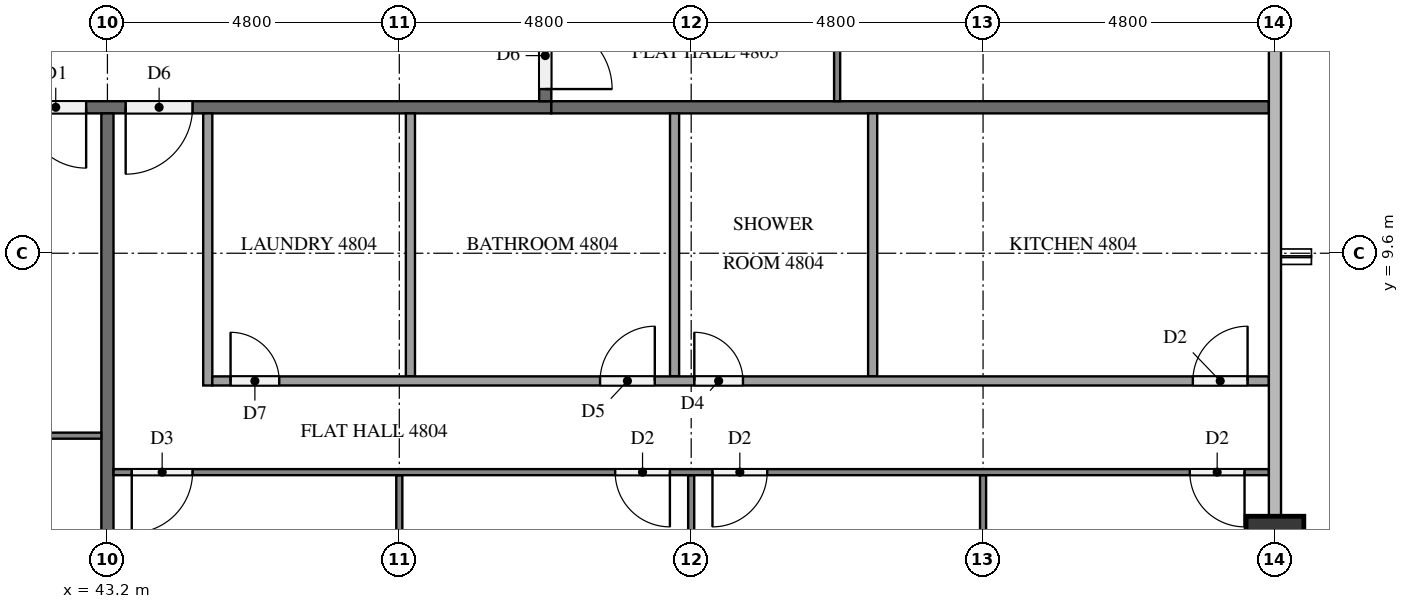
"""IFC4 building model, lengths in metres.
Left out: names, types, materials, properties, quantities, classifications, styles, units other than length and angle.
Written with IfcOpenShell. Run it as: python <this file> out.ifc"""

import sys

from ifc_helpers import new_model, si_unit, direction, frame, frame_2d, origin, origin_2d, place, context, subcontext, project, spatial, rectangle, extrude, element, fill, save


model = new_model("IFC4")
c1 = context("Model", 3, precision=1e-05, world=origin(), true_north=direction((0.0, 1.0)))
c2 = subcontext(c1, "Body", "Model", "MODEL_VIEW")
j1 = project(units=[si_unit("LENGTHUNIT", "METRE"), si_unit("PLANEANGLEUNIT", "RADIAN")], contexts=[c1])
p1 = place(None, origin())
s1 = spatial("IfcSite", under=j1, at=p1, CompositionType="ELEMENT")
p2 = place(p1, origin())
s2 = spatial("IfcBuilding", under=s1, at=p2, CompositionType="ELEMENT")
p3 = place(p2, frame((0.0, 0.0, 185.9)))
s3 = spatial("IfcBuildingStorey", under=s2, at=p3, CompositionType="ELEMENT", Elevation=185.9)
p4 = place(p3, frame((62.4, 4.8, 0.0), z_axis=(0.0, 0.0, 1.0), x_axis=(1.0, 0.0, 0.0)))
e1 = element("IfcColumn", 1, at=p4, inside=s3, PredefinedType="COLUMN", context=c2, shape_type="SweptSolid", body=[
    extrude(rectangle(XDim=0.95, YDim=0.95, at=origin_2d()), origin(), (0.0, 0.0, 1.0), 3.2),
])
p5 = place(p3, frame((50.5, 12.0, 0.0), z_axis=(0.0, 0.0, 1.0), x_axis=(-1.0, 0.0, 0.0)))
e2 = element("IfcWall", 2, at=p5, inside=s3, PredefinedType="PARTITIONING", context=c2, shape_type="SweptSolid", body=[
    extrude(rectangle(XDim=38.6, YDim=0.2, at=frame_2d((19.3, 0.0))), origin(), (0.0, 0.0, 1.0), 3.2),
])
p6 = place(p5, frame((31.65, 0.0, 0.0)))
e3 = element("IfcOpeningElement", 3, at=p6, cuts=e2, PredefinedType="OPENING", context=c2, shape_type="SweptSolid", body=[
    extrude(rectangle(XDim=1.0, YDim=2.1, at=frame_2d((0.5, 1.05))), frame((0.0, 0.11, 0.0), z_axis=(0.0, -1.0, 0.0), x_axis=(1.0, 0.0, 0.0)), (0.0, 0.0, 1.0), 0.22),
])
p7 = place(p5, frame((17.25, 0.0, 0.0)))
e4 = element("IfcOpeningElement", 4, at=p7, cuts=e2, PredefinedType="OPENING", context=c2, shape_type="SweptSolid", body=[
    extrude(rectangle(XDim=1.0, YDim=2.1, at=frame_2d((0.5, 1.05))), frame((0.0, 0.11, 0.0), z_axis=(0.0, -1.0, 0.0), x_axis=(1.0, 0.0, 0.0)), (0.0, 0.0, 1.0), 0.22),
])
p8 = place(p5, frame((7.65, 0.0, 0.0)))
e5 = element("IfcOpeningElement", 5, at=p8, cuts=e2, PredefinedType="OPENING", context=c2, shape_type="SweptSolid", body=[
    extrude(rectangle(XDim=1.0, YDim=2.1, at=frame_2d((0.5, 1.05))), frame((0.0, 0.11, 0.0), z_axis=(0.0, -1.0, 0.0), x_axis=(1.0, 0.0, 0.0)), (0.0, 0.0, 1.0), 0.22),
])
p9 = place(p5, frame((5.9, 0.0, 0.0)))
e6 = element("IfcOpeningElement", 6, at=p9, cuts=e2, PredefinedType="OPENING", context=c2, shape_type="SweptSolid", body=[
    extrude(rectangle(XDim=1.1, YDim=2.1, at=frame_2d((0.55, 1.05))), frame((0.0, 0.11, 0.0), z_axis=(0.0, -1.0, 0.0), x_axis=(1.0, 0.0, 0.0)), (0.0, 0.0, 1.0), 0.22),
])
p10 = place(p3, frame((50.4, 40.7, 0.0), z_axis=(0.0, 0.0, 1.0), x_axis=(0.0, -1.0, 0.0)))
e7 = element("IfcWall", 7, at=p10, inside=s3, PredefinedType="PARTITIONING", context=c2, shape_type="SweptSolid", body=[
    extrude(rectangle(XDim=28.6, YDim=0.2, at=frame_2d((14.3, 0.0))), origin(), (0.0, 0.0, 1.0), 3.2),
])
p11 = place(p10, frame((27.3, 0.0, 0.0)))
e8 = element("IfcOpeningElement", 8, at=p11, cuts=e7, PredefinedType="OPENING", context=c2, shape_type="SweptSolid", body=[
    extrude(rectangle(XDim=1.1, YDim=2.1, at=frame_2d((0.55, 1.05))), frame((0.0, 0.11, 0.0), z_axis=(0.0, -1.0, 0.0), x_axis=(1.0, 0.0, 0.0)), (0.0, 0.0, 1.0), 0.22),
])
p12 = place(p10, frame((8.15, 0.0, 0.0)))
e9 = element("IfcOpeningElement", 9, at=p12, cuts=e7, PredefinedType="OPENING", context=c2, shape_type="SweptSolid", body=[
    extrude(rectangle(XDim=1.0, YDim=2.1, at=frame_2d((0.5, 1.05))), frame((0.0, 0.11, 0.0), z_axis=(0.0, -1.0, 0.0), x_axis=(1.0, 0.0, 0.0)), (0.0, 0.0, 1.0), 0.22),
])
p13 = place(p10, frame((0.95, 0.0, 0.0)))
e10 = element("IfcOpeningElement", 10, at=p13, cuts=e7, PredefinedType="OPENING", context=c2, shape_type="SweptSolid", body=[
    extrude(rectangle(XDim=1.0, YDim=2.1, at=frame_2d((0.5, 1.05))), frame((0.0, 0.11, 0.0), z_axis=(0.0, -1.0, 0.0), x_axis=(1.0, 0.0, 0.0)), (0.0, 0.0, 1.0), 0.22),
])
p14 = place(p3, frame((43.2, 11.9, 0.0), z_axis=(0.0, 0.0, 1.0), x_axis=(0.0, -1.0, 0.0)))
e11 = element("IfcWall", 11, at=p14, inside=s3, PredefinedType="PARTITIONING", context=c2, shape_type="SweptSolid", body=[
    extrude(rectangle(XDim=11.8, YDim=0.2, at=frame_2d((5.9, 0.0))), origin(), (0.0, 0.0, 1.0), 3.2),
])
p15 = place(p3, frame((50.5, 12.0, 0.0), z_axis=(0.0, 0.0, 1.0), x_axis=(1.0, 0.0, 0.0)))
e12 = element("IfcWall", 12, at=p15, inside=s3, PredefinedType="PARTITIONING", context=c2, shape_type="SweptSolid", body=[
    extrude(rectangle(XDim=11.8, YDim=0.2, at=frame_2d((5.9, 0.0))), origin(), (0.0, 0.0, 1.0), 3.2),
])
p16 = place(p3, frame((43.1, 6.6, 0.0), z_axis=(0.0, 0.0, 1.0), x_axis=(-1.0, 0.0, 0.0)))
e13 = element("IfcWall", 13, at=p16, inside=s3, PredefinedType="PARTITIONING", context=c2, shape_type="SweptSolid", body=[
    extrude(rectangle(XDim=9.4, YDim=0.1, at=frame_2d((4.7, 0.0))), origin(), (0.0, 0.0, 1.0), 3.2),
])
p17 = place(p16, frame((3.35, 0.0, 0.0)))
e14 = element("IfcOpeningElement", 14, at=p17, cuts=e13, PredefinedType="OPENING", context=c2, shape_type="SweptSolid", body=[
    extrude(rectangle(XDim=1.0, YDim=2.1, at=frame_2d((0.5, 1.05))), frame((0.0, 0.06, 0.0), z_axis=(0.0, -1.0, 0.0), x_axis=(1.0, 0.0, 0.0)), (0.0, 0.0, 1.0), 0.12),
])
p18 = place(p16, frame((5.05, 0.0, 0.0)))
e15 = element("IfcOpeningElement", 15, at=p18, cuts=e13, PredefinedType="OPENING", context=c2, shape_type="SweptSolid", body=[
    extrude(rectangle(XDim=0.9, YDim=2.1, at=frame_2d((0.45, 1.05))), frame((0.0, 0.06, 0.0), z_axis=(0.0, -1.0, 0.0), x_axis=(1.0, 0.0, 0.0)), (0.0, 0.0, 1.0), 0.12),
])
p19 = place(p3, frame((48.0, 5.95, 0.0), z_axis=(0.0, 0.0, 1.0), x_axis=(0.0, -1.0, 0.0)))
e16 = element("IfcWall", 16, at=p19, inside=s3, PredefinedType="PARTITIONING", context=c2, shape_type="SweptSolid", body=[
    extrude(rectangle(XDim=5.625, YDim=0.1, at=frame_2d((2.812, 0.0))), origin(), (0.0, 0.0, 1.0), 3.2),
])
p20 = place(p3, frame((52.8, 5.95, 0.0), z_axis=(0.0, 0.0, 1.0), x_axis=(0.0, -1.0, 0.0)))
e17 = element("IfcWall", 17, at=p20, inside=s3, PredefinedType="PARTITIONING", context=c2, shape_type="SweptSolid", body=[
    extrude(rectangle(XDim=5.85, YDim=0.1, at=frame_2d((2.925, 0.0))), origin(), (0.0, 0.0, 1.0), 3.2),
])
p21 = place(p3, frame((57.6, 5.95, 0.0), z_axis=(0.0, 0.0, 1.0), x_axis=(0.0, -1.0, 0.0)))
e18 = element("IfcWall", 18, at=p21, inside=s3, PredefinedType="PARTITIONING", context=c2, shape_type="SweptSolid", body=[
    extrude(rectangle(XDim=5.475, YDim=0.1, at=frame_2d((2.737, 0.0))), origin(), (0.0, 0.0, 1.0), 3.2),
])
p22 = place(p3, frame((62.3, 6.0, 0.0), z_axis=(0.0, 0.0, 1.0), x_axis=(-1.0, 0.0, 0.0)))
e19 = element("IfcWall", 19, at=p22, inside=s3, PredefinedType="PARTITIONING", context=c2, shape_type="SweptSolid", body=[
    extrude(rectangle(XDim=19.0, YDim=0.1, at=frame_2d((9.5, 0.0))), origin(), (0.0, 0.0, 1.0), 3.2),
])
p23 = place(p22, frame((17.7, 0.0, 0.0)))
e20 = element("IfcOpeningElement", 20, at=p23, cuts=e19, PredefinedType="OPENING", context=c2, shape_type="SweptSolid", body=[
    extrude(rectangle(XDim=1.0, YDim=2.1, at=frame_2d((0.5, 1.05))), frame((0.0, 0.06, 0.0), z_axis=(0.0, -1.0, 0.0), x_axis=(1.0, 0.0, 0.0)), (0.0, 0.0, 1.0), 0.12),
])
p24 = place(p22, frame((9.85, 0.0, 0.0)))
e21 = element("IfcOpeningElement", 21, at=p24, cuts=e19, PredefinedType="OPENING", context=c2, shape_type="SweptSolid", body=[
    extrude(rectangle(XDim=0.9, YDim=2.1, at=frame_2d((0.45, 1.05))), frame((0.0, 0.06, 0.0), z_axis=(0.0, -1.0, 0.0), x_axis=(1.0, 0.0, 0.0)), (0.0, 0.0, 1.0), 0.12),
])
p25 = place(p22, frame((8.25, 0.0, 0.0)))
e22 = element("IfcOpeningElement", 22, at=p25, cuts=e19, PredefinedType="OPENING", context=c2, shape_type="SweptSolid", body=[
    extrude(rectangle(XDim=0.9, YDim=2.1, at=frame_2d((0.45, 1.05))), frame((0.0, 0.06, 0.0), z_axis=(0.0, -1.0, 0.0), x_axis=(1.0, 0.0, 0.0)), (0.0, 0.0, 1.0), 0.12),
])
p26 = place(p22, frame((0.4, 0.0, 0.0)))
e23 = element("IfcOpeningElement", 23, at=p26, cuts=e19, PredefinedType="OPENING", context=c2, shape_type="SweptSolid", body=[
    extrude(rectangle(XDim=0.9, YDim=2.1, at=frame_2d((0.45, 1.05))), frame((0.0, 0.06, 0.0), z_axis=(0.0, -1.0, 0.0), x_axis=(1.0, 0.0, 0.0)), (0.0, 0.0, 1.0), 0.12),
])
for number, where, z_axis, x_axis in (
    (24, (48.183, 11.9, 0.0), (0.0, 0.0, 1.0), (0.0, -1.0, 0.0)),
    (25, (52.527, 11.9, 0.0), (0.0, 0.0, 1.0), (0.0, -1.0, 0.0)),
    (26, (55.784, 11.9, 0.0), (0.0, 0.0, 1.0), (0.0, -1.0, 0.0)),
):
    element("IfcWall", number, at=place(p3, frame(where, z_axis=z_axis, x_axis=x_axis)), inside=s3, PredefinedType="PARTITIONING", context=c2, shape_type="SweptSolid", body=[
        extrude(rectangle(XDim=4.325, YDim=0.15, at=frame_2d((2.163, 0.0))), origin(), (0.0, 0.0, 1.0), 3.2),
    ])
p27 = place(p3, frame((44.85, 11.9, 0.0), z_axis=(0.0, 0.0, 1.0), x_axis=(0.0, -1.0, 0.0)))
e27 = element("IfcWall", 27, at=p27, inside=s3, PredefinedType="PARTITIONING", context=c2, shape_type="SweptSolid", body=[
    extrude(rectangle(XDim=4.475, YDim=0.15, at=frame_2d((2.237, 0.0))), origin(), (0.0, 0.0, 1.0), 3.2),
])
p28 = place(p3, frame((44.925, 7.5, 0.0), z_axis=(0.0, 0.0, 1.0), x_axis=(1.0, 0.0, 0.0)))
e28 = element("IfcWall", 28, at=p28, inside=s3, PredefinedType="PARTITIONING", context=c2, shape_type="SweptSolid", body=[
    extrude(rectangle(XDim=17.375, YDim=0.15, at=frame_2d((8.688, 0.0))), origin(), (0.0, 0.0, 1.0), 3.2),
])
p29 = place(p28, frame((0.3, 0.0, 0.0)))
e29 = element("IfcOpeningElement", 29, at=p29, cuts=e28, PredefinedType="OPENING", context=c2, shape_type="SweptSolid", body=[
    extrude(rectangle(XDim=0.8, YDim=2.1, at=frame_2d((0.4, 1.05))), frame((0.0, 0.085, 0.0), z_axis=(0.0, -1.0, 0.0), x_axis=(1.0, 0.0, 0.0)), (0.0, 0.0, 1.0), 0.17),
])
p30 = place(p28, frame((6.377, 0.0, 0.0)))
e30 = element("IfcOpeningElement", 30, at=p30, cuts=e28, PredefinedType="OPENING", context=c2, shape_type="SweptSolid", body=[
    extrude(rectangle(XDim=0.9, YDim=2.1, at=frame_2d((0.45, 1.05))), frame((0.0, 0.085, 0.0), z_axis=(0.0, -1.0, 0.0), x_axis=(1.0, 0.0, 0.0)), (0.0, 0.0, 1.0), 0.17),
])
p31 = place(p28, frame((7.927, 0.0, 0.0)))
e31 = element("IfcOpeningElement", 31, at=p31, cuts=e28, PredefinedType="OPENING", context=c2, shape_type="SweptSolid", body=[
    extrude(rectangle(XDim=0.8, YDim=2.1, at=frame_2d((0.4, 1.05))), frame((0.0, 0.085, 0.0), z_axis=(0.0, -1.0, 0.0), x_axis=(1.0, 0.0, 0.0)), (0.0, 0.0, 1.0), 0.17),
])
p32 = place(p28, frame((16.125, 0.0, 0.0)))
e32 = element("IfcOpeningElement", 32, at=p32, cuts=e28, PredefinedType="OPENING", context=c2, shape_type="SweptSolid", body=[
    extrude(rectangle(XDim=0.9, YDim=2.1, at=frame_2d((0.45, 1.05))), frame((0.0, 0.085, 0.0), z_axis=(0.0, -1.0, 0.0), x_axis=(1.0, 0.0, 0.0)), (0.0, 0.0, 1.0), 0.17),
])
p33 = place(p3, frame((55.2, 31.1, 0.0), z_axis=(0.0, 0.0, 1.0), x_axis=(0.0, -1.0, 0.0)))
e33 = element("IfcWall", 33, at=p33, inside=s3, PredefinedType="PARTITIONING", context=c2, shape_type="SweptSolid", body=[
    extrude(rectangle(XDim=19.0, YDim=0.1, at=frame_2d((9.5, 0.0))), origin(), (0.0, 0.0, 1.0), 3.2),
])
p34 = place(p33, frame((14.65, 0.0, 0.0)))
e34 = element("IfcOpeningElement", 34, at=p34, cuts=e33, PredefinedType="OPENING", context=c2, shape_type="SweptSolid", body=[
    extrude(rectangle(XDim=0.9, YDim=2.1, at=frame_2d((0.45, 1.05))), frame((0.0, 0.06, 0.0), z_axis=(0.0, -1.0, 0.0), x_axis=(1.0, 0.0, 0.0)), (0.0, 0.0, 1.0), 0.12),
])
p35 = place(p33, frame((12.95, 0.0, 0.0)))
e35 = element("IfcOpeningElement", 35, at=p35, cuts=e33, PredefinedType="OPENING", context=c2, shape_type="SweptSolid", body=[
    extrude(rectangle(XDim=1.0, YDim=2.1, at=frame_2d((0.5, 1.05))), frame((0.0, 0.06, 0.0), z_axis=(0.0, -1.0, 0.0), x_axis=(1.0, 0.0, 0.0)), (0.0, 0.0, 1.0), 0.12),
])
p36 = place(p33, frame((5.05, 0.0, 0.0)))
e36 = element("IfcOpeningElement", 36, at=p36, cuts=e33, PredefinedType="OPENING", context=c2, shape_type="SweptSolid", body=[
    extrude(rectangle(XDim=0.9, YDim=2.1, at=frame_2d((0.45, 1.05))), frame((0.0, 0.06, 0.0), z_axis=(0.0, -1.0, 0.0), x_axis=(1.0, 0.0, 0.0)), (0.0, 0.0, 1.0), 0.12),
])
p37 = place(p33, frame((3.45, 0.0, 0.0)))
e37 = element("IfcOpeningElement", 37, at=p37, cuts=e33, PredefinedType="OPENING", context=c2, shape_type="SweptSolid", body=[
    extrude(rectangle(XDim=0.9, YDim=2.1, at=frame_2d((0.45, 1.05))), frame((0.0, 0.06, 0.0), z_axis=(0.0, -1.0, 0.0), x_axis=(1.0, 0.0, 0.0)), (0.0, 0.0, 1.0), 0.12),
])
p38 = place(p8, origin())
e38 = element("IfcDoor", 38, at=p38, inside=s3, OperationType="SINGLE_SWING_LEFT", PredefinedType="DOOR", context=c2, shape_type="SweptSolid", body=[
    extrude(rectangle(XDim=1.0, YDim=2.1, at=frame_2d((0.5, 1.05))), frame((0.0, 0.025, 0.0), z_axis=(0.0, -1.0, 0.0), x_axis=(1.0, 0.0, 0.0)), (0.0, 0.0, 1.0), 0.05),
])
fill(e5, e38)
p39 = place(p9, origin())
e39 = element("IfcDoor", 39, at=p39, inside=s3, OperationType="SINGLE_SWING_RIGHT", PredefinedType="DOOR", context=c2, shape_type="SweptSolid", body=[
    extrude(rectangle(XDim=1.1, YDim=2.1, at=frame_2d((0.55, 1.05))), frame((0.0, 0.025, 0.0), z_axis=(0.0, -1.0, 0.0), x_axis=(1.0, 0.0, 0.0)), (0.0, 0.0, 1.0), 0.05),
])
fill(e6, e39)
p40 = place(p11, origin())
e40 = element("IfcDoor", 40, at=p40, inside=s3, OperationType="SINGLE_SWING_RIGHT", PredefinedType="DOOR", context=c2, shape_type="SweptSolid", body=[
    extrude(rectangle(XDim=1.1, YDim=2.1, at=frame_2d((0.55, 1.05))), frame((0.0, 0.025, 0.0), z_axis=(0.0, -1.0, 0.0), x_axis=(1.0, 0.0, 0.0)), (0.0, 0.0, 1.0), 0.05),
])
fill(e8, e40)
p41 = place(p23, origin())
e41 = element("IfcDoor", 41, at=p41, inside=s3, OperationType="SINGLE_SWING_RIGHT", PredefinedType="DOOR", context=c2, shape_type="SweptSolid", body=[
    extrude(rectangle(XDim=1.0, YDim=2.1, at=frame_2d((0.5, 1.05))), frame((0.0, 0.025, 0.0), z_axis=(0.0, -1.0, 0.0), x_axis=(1.0, 0.0, 0.0)), (0.0, 0.0, 1.0), 0.05),
])
fill(e20, e41)
p42 = place(p24, origin())
e42 = element("IfcDoor", 42, at=p42, inside=s3, OperationType="SINGLE_SWING_LEFT", PredefinedType="DOOR", context=c2, shape_type="SweptSolid", body=[
    extrude(rectangle(XDim=0.9, YDim=2.1, at=frame_2d((0.45, 1.05))), frame((0.0, 0.025, 0.0), z_axis=(0.0, -1.0, 0.0), x_axis=(1.0, 0.0, 0.0)), (0.0, 0.0, 1.0), 0.05),
])
fill(e21, e42)
p43 = place(p25, origin())
e43 = element("IfcDoor", 43, at=p43, inside=s3, OperationType="SINGLE_SWING_RIGHT", PredefinedType="DOOR", context=c2, shape_type="SweptSolid", body=[
    extrude(rectangle(XDim=0.9, YDim=2.1, at=frame_2d((0.45, 1.05))), frame((0.0, 0.025, 0.0), z_axis=(0.0, -1.0, 0.0), x_axis=(1.0, 0.0, 0.0)), (0.0, 0.0, 1.0), 0.05),
])
fill(e22, e43)
p44 = place(p26, origin())
e44 = element("IfcDoor", 44, at=p44, inside=s3, OperationType="SINGLE_SWING_LEFT", PredefinedType="DOOR", context=c2, shape_type="SweptSolid", body=[
    extrude(rectangle(XDim=0.9, YDim=2.1, at=frame_2d((0.45, 1.05))), frame((0.0, 0.025, 0.0), z_axis=(0.0, -1.0, 0.0), x_axis=(1.0, 0.0, 0.0)), (0.0, 0.0, 1.0), 0.05),
])
fill(e23, e44)
p45 = place(p29, origin())
e45 = element("IfcDoor", 45, at=p45, inside=s3, OperationType="SINGLE_SWING_LEFT", PredefinedType="DOOR", context=c2, shape_type="SweptSolid", body=[
    extrude(rectangle(XDim=0.8, YDim=2.1, at=frame_2d((0.4, 1.05))), frame((0.0, 0.025, 0.0), z_axis=(0.0, -1.0, 0.0), x_axis=(1.0, 0.0, 0.0)), (0.0, 0.0, 1.0), 0.05),
])
fill(e29, e45)
p46 = place(p30, origin())
e46 = element("IfcDoor", 46, at=p46, inside=s3, OperationType="SINGLE_SWING_RIGHT", PredefinedType="DOOR", context=c2, shape_type="SweptSolid", body=[
    extrude(rectangle(XDim=0.9, YDim=2.1, at=frame_2d((0.45, 1.05))), frame((0.0, 0.025, 0.0), z_axis=(0.0, -1.0, 0.0), x_axis=(1.0, 0.0, 0.0)), (0.0, 0.0, 1.0), 0.05),
])
fill(e30, e46)
p47 = place(p31, origin())
e47 = element("IfcDoor", 47, at=p47, inside=s3, OperationType="SINGLE_SWING_LEFT", PredefinedType="DOOR", context=c2, shape_type="SweptSolid", body=[
    extrude(rectangle(XDim=0.8, YDim=2.1, at=frame_2d((0.4, 1.05))), frame((0.0, 0.025, 0.0), z_axis=(0.0, -1.0, 0.0), x_axis=(1.0, 0.0, 0.0)), (0.0, 0.0, 1.0), 0.05),
])
fill(e31, e47)
p48 = place(p32, origin())
e48 = element("IfcDoor", 48, at=p48, inside=s3, OperationType="SINGLE_SWING_RIGHT", PredefinedType="DOOR", context=c2, shape_type="SweptSolid", body=[
    extrude(rectangle(XDim=0.9, YDim=2.1, at=frame_2d((0.45, 1.05))), frame((0.0, 0.025, 0.0), z_axis=(0.0, -1.0, 0.0), x_axis=(1.0, 0.0, 0.0)), (0.0, 0.0, 1.0), 0.05),
])
fill(e32, e48)
save(model, sys.argv[1])
